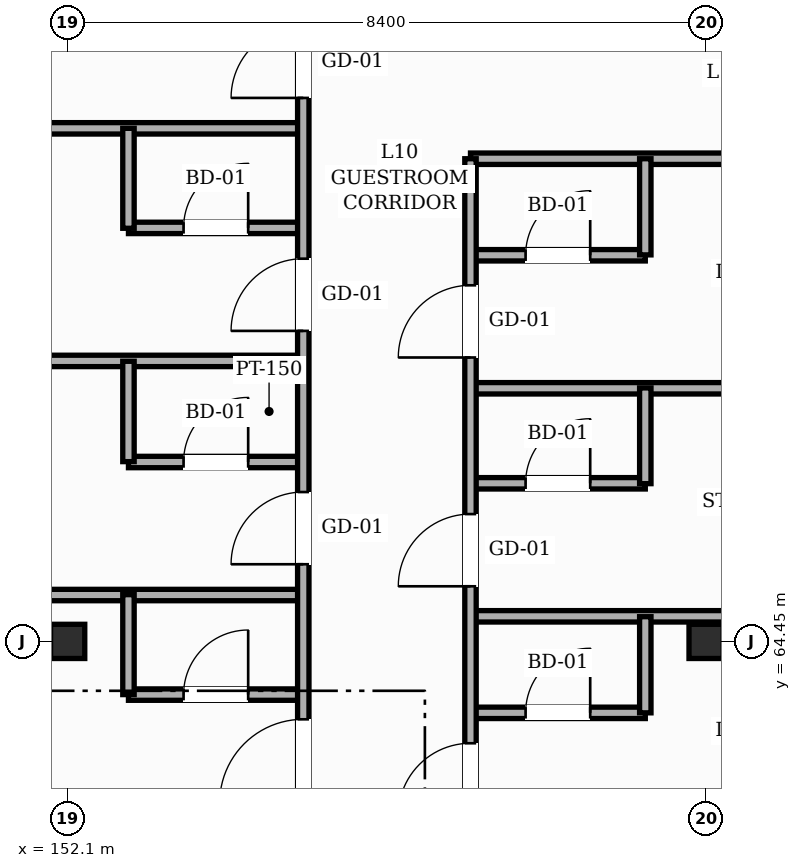
"""IFC4 building model, lengths in metres.
Left out: names, types, materials, properties, quantities, classifications, styles, units other than length and angle.
Written with IfcOpenShell. Run it as: python <this file> out.ifc"""

import sys

from ifc_helpers import new_model, si_unit, direction, frame, frame_2d, origin, origin_2d, place, context, subcontext, project, spatial, rectangle, hollow_rectangle, extrude, element, fill, save


model = new_model("IFC4")
c1 = context("Model", 3, precision=1e-05, world=origin(), true_north=direction((0.0, 1.0)))
c2 = subcontext(c1, "Body", "Model", "MODEL_VIEW")
j1 = project(units=[si_unit("LENGTHUNIT", "METRE"), si_unit("PLANEANGLEUNIT", "RADIAN")], contexts=[c1])
p1 = place(None, origin())
s1 = spatial("IfcSite", under=j1, at=p1, CompositionType="ELEMENT")
p2 = place(p1, origin())
s2 = spatial("IfcBuilding", under=s1, at=p2, CompositionType="ELEMENT")
p3 = place(p2, frame((0.0, 0.0, 42.6)))
s3 = spatial("IfcBuildingStorey", under=s2, at=p3, CompositionType="ELEMENT", Elevation=42.6)
for number, where, z_axis, x_axis in (
    (1, (152.1, 64.45, 0.0), (0.0, 0.0, 1.0), (1.0, 0.0, 0.0)),
    (2, (160.5, 64.45, 0.0), (0.0, 0.0, 1.0), (1.0, 0.0, 0.0)),
):
    element("IfcColumn", number, at=place(p3, frame(where, z_axis=z_axis, x_axis=x_axis)), inside=s3, PredefinedType="COLUMN", context=c2, shape_type="SweptSolid", body=[
        extrude(hollow_rectangle(XDim=0.45, YDim=0.45, WallThickness=0.019, InnerFilletRadius=0.019, OuterFilletRadius=0.038, at=origin_2d()), origin(), (0.0, 0.0, 1.0), 3.6),
    ])
p4 = place(p3, frame((157.4, 63.51, 0.0), z_axis=(0.0, 0.0, 1.0), x_axis=(1.0, 0.0, 0.0)))
e3 = element("IfcWall", 3, at=p4, inside=s3, PredefinedType="PARTITIONING", context=c2, shape_type="SweptSolid", body=[
    extrude(rectangle(XDim=2.3, YDim=0.15, at=frame_2d((1.15, 0.0))), origin(), (0.0, 0.0, 1.0), 3.365),
])
p5 = place(p4, frame((0.725, 0.0, 0.0)))
e4 = element("IfcOpeningElement", 4, at=p5, cuts=e3, PredefinedType="OPENING", context=c2, shape_type="SweptSolid", body=[
    extrude(rectangle(XDim=0.85, YDim=2.1, at=frame_2d((0.425, 1.05))), frame((0.0, 0.085, 0.0), z_axis=(0.0, -1.0, 0.0), x_axis=(1.0, 0.0, 0.0)), (0.0, 0.0, 1.0), 0.17),
])
p6 = place(p3, frame((152.9, 63.75, 0.0), z_axis=(0.0, 0.0, 1.0), x_axis=(1.0, 0.0, 0.0)))
e5 = element("IfcWall", 5, at=p6, inside=s3, PredefinedType="PARTITIONING", context=c2, shape_type="SweptSolid", body=[
    extrude(rectangle(XDim=2.3, YDim=0.15, at=frame_2d((1.15, 0.0))), origin(), (0.0, 0.0, 1.0), 3.365),
])
p7 = place(p6, frame((0.725, 0.0, 0.0)))
e6 = element("IfcOpeningElement", 6, at=p7, cuts=e5, PredefinedType="OPENING", context=c2, shape_type="SweptSolid", body=[
    extrude(rectangle(XDim=0.85, YDim=2.1, at=frame_2d((0.425, 1.05))), frame((0.0, 0.085, 0.0), z_axis=(0.0, -1.0, 0.0), x_axis=(1.0, 0.0, 0.0)), (0.0, 0.0, 1.0), 0.17),
])
p8 = place(p3, frame((157.4, 64.78, 0.0), z_axis=(0.0, 0.0, 1.0), x_axis=(1.0, 0.0, 0.0)))
e7 = element("IfcWall", 7, at=p8, inside=s3, PredefinedType="PARTITIONING", context=c2, shape_type="SweptSolid", body=[
    extrude(rectangle(XDim=9.8, YDim=0.15, at=frame_2d((4.9, 0.0))), origin(), (0.0, 0.0, 1.0), 3.365),
])
p9 = place(p3, frame((144.2, 65.06, 0.0), z_axis=(0.0, 0.0, 1.0), x_axis=(1.0, 0.0, 0.0)))
e8 = element("IfcWall", 8, at=p9, inside=s3, PredefinedType="PARTITIONING", context=c2, shape_type="SweptSolid", body=[
    extrude(rectangle(XDim=11.0, YDim=0.15, at=frame_2d((5.5, 0.0))), origin(), (0.0, 0.0, 1.0), 3.365),
])
p10 = place(p3, frame((157.4, 66.53, 0.0), z_axis=(0.0, 0.0, 1.0), x_axis=(1.0, 0.0, 0.0)))
e9 = element("IfcWall", 9, at=p10, inside=s3, PredefinedType="PARTITIONING", context=c2, shape_type="SweptSolid", body=[
    extrude(rectangle(XDim=2.3, YDim=0.15, at=frame_2d((1.15, 0.0))), origin(), (0.0, 0.0, 1.0), 3.365),
])
p11 = place(p10, frame((0.725, 0.0, 0.0)))
e10 = element("IfcOpeningElement", 10, at=p11, cuts=e9, PredefinedType="OPENING", context=c2, shape_type="SweptSolid", body=[
    extrude(rectangle(XDim=0.85, YDim=2.1, at=frame_2d((0.425, 1.05))), frame((0.0, 0.085, 0.0), z_axis=(0.0, -1.0, 0.0), x_axis=(1.0, 0.0, 0.0)), (0.0, 0.0, 1.0), 0.17),
])
p12 = place(p3, frame((152.9, 66.81, 0.0), z_axis=(0.0, 0.0, 1.0), x_axis=(1.0, 0.0, 0.0)))
e11 = element("IfcWall", 11, at=p12, inside=s3, PredefinedType="PARTITIONING", context=c2, shape_type="SweptSolid", body=[
    extrude(rectangle(XDim=2.3, YDim=0.15, at=frame_2d((1.15, 0.0))), origin(), (0.0, 0.0, 1.0), 3.365),
])
p13 = place(p12, frame((0.725, 0.0, 0.0)))
e12 = element("IfcOpeningElement", 12, at=p13, cuts=e11, PredefinedType="OPENING", context=c2, shape_type="SweptSolid", body=[
    extrude(rectangle(XDim=0.85, YDim=2.1, at=frame_2d((0.425, 1.05))), frame((0.0, 0.085, 0.0), z_axis=(0.0, -1.0, 0.0), x_axis=(1.0, 0.0, 0.0)), (0.0, 0.0, 1.0), 0.17),
])
p14 = place(p3, frame((157.4, 67.78, 0.0), z_axis=(0.0, 0.0, 1.0), x_axis=(1.0, 0.0, 0.0)))
e13 = element("IfcWall", 13, at=p14, inside=s3, PredefinedType="PARTITIONING", context=c2, shape_type="SweptSolid", body=[
    extrude(rectangle(XDim=9.8, YDim=0.15, at=frame_2d((4.9, 0.0))), origin(), (0.0, 0.0, 1.0), 3.365),
])
p15 = place(p3, frame((144.2, 68.14, 0.0), z_axis=(0.0, 0.0, 1.0), x_axis=(1.0, 0.0, 0.0)))
e14 = element("IfcWall", 14, at=p15, inside=s3, PredefinedType="PARTITIONING", context=c2, shape_type="SweptSolid", body=[
    extrude(rectangle(XDim=11.0, YDim=0.15, at=frame_2d((5.5, 0.0))), origin(), (0.0, 0.0, 1.0), 3.365),
])
p16 = place(p3, frame((157.4, 69.53, 0.0), z_axis=(0.0, 0.0, 1.0), x_axis=(1.0, 0.0, 0.0)))
e15 = element("IfcWall", 15, at=p16, inside=s3, PredefinedType="PARTITIONING", context=c2, shape_type="SweptSolid", body=[
    extrude(rectangle(XDim=2.3, YDim=0.15, at=frame_2d((1.15, 0.0))), origin(), (0.0, 0.0, 1.0), 3.365),
])
p17 = place(p16, frame((0.725, 0.0, 0.0)))
e16 = element("IfcOpeningElement", 16, at=p17, cuts=e15, PredefinedType="OPENING", context=c2, shape_type="SweptSolid", body=[
    extrude(rectangle(XDim=0.85, YDim=2.1, at=frame_2d((0.425, 1.05))), frame((0.0, 0.085, 0.0), z_axis=(0.0, -1.0, 0.0), x_axis=(1.0, 0.0, 0.0)), (0.0, 0.0, 1.0), 0.17),
])
p18 = place(p3, frame((152.9, 69.89, 0.0), z_axis=(0.0, 0.0, 1.0), x_axis=(1.0, 0.0, 0.0)))
e17 = element("IfcWall", 17, at=p18, inside=s3, PredefinedType="PARTITIONING", context=c2, shape_type="SweptSolid", body=[
    extrude(rectangle(XDim=2.3, YDim=0.15, at=frame_2d((1.15, 0.0))), origin(), (0.0, 0.0, 1.0), 3.365),
])
p19 = place(p18, frame((0.725, 0.0, 0.0)))
e18 = element("IfcOpeningElement", 18, at=p19, cuts=e17, PredefinedType="OPENING", context=c2, shape_type="SweptSolid", body=[
    extrude(rectangle(XDim=0.85, YDim=2.1, at=frame_2d((0.425, 1.05))), frame((0.0, 0.085, 0.0), z_axis=(0.0, -1.0, 0.0), x_axis=(1.0, 0.0, 0.0)), (0.0, 0.0, 1.0), 0.17),
])
p20 = place(p3, frame((157.4, 70.8, 0.0), z_axis=(0.0, 0.0, 1.0), x_axis=(1.0, 0.0, 0.0)))
e19 = element("IfcWall", 19, at=p20, inside=s3, PredefinedType="PARTITIONING", context=c2, shape_type="SweptSolid", body=[
    extrude(rectangle(XDim=9.8, YDim=0.15, at=frame_2d((4.9, 0.0))), origin(), (0.0, 0.0, 1.0), 3.365),
])
p21 = place(p3, frame((144.2, 71.2, 0.0), z_axis=(0.0, 0.0, 1.0), x_axis=(1.0, 0.0, 0.0)))
e20 = element("IfcWall", 20, at=p21, inside=s3, PredefinedType="PARTITIONING", context=c2, shape_type="SweptSolid", body=[
    extrude(rectangle(XDim=11.0, YDim=0.15, at=frame_2d((5.5, 0.0))), origin(), (0.0, 0.0, 1.0), 3.365),
])
p22 = place(p3, frame((152.9, 63.75, 0.0), z_axis=(0.0, 0.0, 1.0), x_axis=(0.0, 1.0, 0.0)))
e21 = element("IfcWall", 21, at=p22, inside=s3, PredefinedType="PARTITIONING", context=c2, shape_type="SweptSolid", body=[
    extrude(rectangle(XDim=1.315, YDim=0.15, at=frame_2d((0.657, 0.0))), origin(), (0.0, 0.0, 1.0), 3.365),
])
p23 = place(p3, frame((152.9, 66.815, 0.0), z_axis=(0.0, 0.0, 1.0), x_axis=(0.0, 1.0, 0.0)))
e22 = element("IfcWall", 22, at=p23, inside=s3, PredefinedType="PARTITIONING", context=c2, shape_type="SweptSolid", body=[
    extrude(rectangle(XDim=1.32, YDim=0.15, at=frame_2d((0.66, 0.0))), origin(), (0.0, 0.0, 1.0), 3.365),
])
p24 = place(p3, frame((152.9, 69.885, 0.0), z_axis=(0.0, 0.0, 1.0), x_axis=(0.0, 1.0, 0.0)))
e23 = element("IfcWall", 23, at=p24, inside=s3, PredefinedType="PARTITIONING", context=c2, shape_type="SweptSolid", body=[
    extrude(rectangle(XDim=1.315, YDim=0.15, at=frame_2d((0.657, 0.0))), origin(), (0.0, 0.0, 1.0), 3.365),
])
p25 = place(p3, frame((155.2, 62.0, 0.0), z_axis=(0.0, 0.0, 1.0), x_axis=(0.0, 1.0, 0.0)))
e24 = element("IfcWall", 24, at=p25, inside=s3, PredefinedType="PARTITIONING", context=c2, shape_type="SweptSolid", body=[
    extrude(rectangle(XDim=18.4, YDim=0.15, at=frame_2d((9.2, 0.0))), origin(), (0.0, 0.0, 1.0), 3.365),
])
p26 = place(p25, frame((0.325, 0.0, 0.0)))
e25 = element("IfcOpeningElement", 25, at=p26, cuts=e24, PredefinedType="OPENING", context=c2, shape_type="SweptSolid", body=[
    extrude(rectangle(XDim=1.1, YDim=2.2, at=frame_2d((0.55, 1.1))), frame((0.0, 0.085, 0.0), z_axis=(0.0, -1.0, 0.0), x_axis=(1.0, 0.0, 0.0)), (0.0, 0.0, 1.0), 0.17),
])
p27 = place(p25, frame((3.465, 0.0, 0.0)))
e26 = element("IfcOpeningElement", 26, at=p27, cuts=e24, PredefinedType="OPENING", context=c2, shape_type="SweptSolid", body=[
    extrude(rectangle(XDim=0.95, YDim=2.15, at=frame_2d((0.475, 1.075))), frame((0.0, 0.085, 0.0), z_axis=(0.0, -1.0, 0.0), x_axis=(1.0, 0.0, 0.0)), (0.0, 0.0, 1.0), 0.17),
])
p28 = place(p25, frame((6.535, 0.0, 0.0)))
e27 = element("IfcOpeningElement", 27, at=p28, cuts=e24, PredefinedType="OPENING", context=c2, shape_type="SweptSolid", body=[
    extrude(rectangle(XDim=0.95, YDim=2.15, at=frame_2d((0.475, 1.075))), frame((0.0, 0.085, 0.0), z_axis=(0.0, -1.0, 0.0), x_axis=(1.0, 0.0, 0.0)), (0.0, 0.0, 1.0), 0.17),
])
p29 = place(p25, frame((9.6, 0.0, 0.0)))
e28 = element("IfcOpeningElement", 28, at=p29, cuts=e24, PredefinedType="OPENING", context=c2, shape_type="SweptSolid", body=[
    extrude(rectangle(XDim=0.95, YDim=2.15, at=frame_2d((0.475, 1.075))), frame((0.0, 0.085, 0.0), z_axis=(0.0, -1.0, 0.0), x_axis=(1.0, 0.0, 0.0)), (0.0, 0.0, 1.0), 0.17),
])
p30 = place(p25, frame((12.665, 0.0, 0.0)))
e29 = element("IfcOpeningElement", 29, at=p30, cuts=e24, PredefinedType="OPENING", context=c2, shape_type="SweptSolid", body=[
    extrude(rectangle(XDim=0.95, YDim=2.15, at=frame_2d((0.475, 1.075))), frame((0.0, 0.085, 0.0), z_axis=(0.0, -1.0, 0.0), x_axis=(1.0, 0.0, 0.0)), (0.0, 0.0, 1.0), 0.17),
])
p31 = place(p25, frame((15.735, 0.0, 0.0)))
e30 = element("IfcOpeningElement", 30, at=p31, cuts=e24, PredefinedType="OPENING", context=c2, shape_type="SweptSolid", body=[
    extrude(rectangle(XDim=0.95, YDim=2.15, at=frame_2d((0.475, 1.075))), frame((0.0, 0.085, 0.0), z_axis=(0.0, -1.0, 0.0), x_axis=(1.0, 0.0, 0.0)), (0.0, 0.0, 1.0), 0.17),
])
p32 = place(p3, frame((157.4, 22.6, 0.0), z_axis=(0.0, 0.0, 1.0), x_axis=(0.0, 1.0, 0.0)))
e31 = element("IfcWall", 31, at=p32, inside=s3, PredefinedType="PARTITIONING", context=c2, shape_type="SweptSolid", body=[
    extrude(rectangle(XDim=48.2, YDim=0.15, at=frame_2d((24.1, 0.0))), origin(), (0.0, 0.0, 1.0), 3.365),
])
p33 = place(p32, frame((0.325, 0.0, 0.0)))
e32 = element("IfcOpeningElement", 32, at=p33, cuts=e31, PredefinedType="OPENING", context=c2, shape_type="SweptSolid", body=[
    extrude(rectangle(XDim=1.1, YDim=2.2, at=frame_2d((0.55, 1.1))), frame((0.0, 0.085, 0.0), z_axis=(0.0, -1.0, 0.0), x_axis=(1.0, 0.0, 0.0)), (0.0, 0.0, 1.0), 0.17),
])
p34 = place(p32, frame((3.41, 0.0, 0.0)))
e33 = element("IfcOpeningElement", 33, at=p34, cuts=e31, PredefinedType="OPENING", context=c2, shape_type="SweptSolid", body=[
    extrude(rectangle(XDim=0.95, YDim=2.15, at=frame_2d((0.475, 1.075))), frame((0.0, 0.085, 0.0), z_axis=(0.0, -1.0, 0.0), x_axis=(1.0, 0.0, 0.0)), (0.0, 0.0, 1.0), 0.17),
])
p35 = place(p32, frame((6.425, 0.0, 0.0)))
e34 = element("IfcOpeningElement", 34, at=p35, cuts=e31, PredefinedType="OPENING", context=c2, shape_type="SweptSolid", body=[
    extrude(rectangle(XDim=0.95, YDim=2.15, at=frame_2d((0.475, 1.075))), frame((0.0, 0.085, 0.0), z_axis=(0.0, -1.0, 0.0), x_axis=(1.0, 0.0, 0.0)), (0.0, 0.0, 1.0), 0.17),
])
p36 = place(p32, frame((9.44, 0.0, 0.0)))
e35 = element("IfcOpeningElement", 35, at=p36, cuts=e31, PredefinedType="OPENING", context=c2, shape_type="SweptSolid", body=[
    extrude(rectangle(XDim=0.95, YDim=2.15, at=frame_2d((0.475, 1.075))), frame((0.0, 0.085, 0.0), z_axis=(0.0, -1.0, 0.0), x_axis=(1.0, 0.0, 0.0)), (0.0, 0.0, 1.0), 0.17),
])
p37 = place(p32, frame((12.45, 0.0, 0.0)))
e36 = element("IfcOpeningElement", 36, at=p37, cuts=e31, PredefinedType="OPENING", context=c2, shape_type="SweptSolid", body=[
    extrude(rectangle(XDim=0.95, YDim=2.15, at=frame_2d((0.475, 1.075))), frame((0.0, 0.085, 0.0), z_axis=(0.0, -1.0, 0.0), x_axis=(1.0, 0.0, 0.0)), (0.0, 0.0, 1.0), 0.17),
])
p38 = place(p32, frame((15.46, 0.0, 0.0)))
e37 = element("IfcOpeningElement", 37, at=p38, cuts=e31, PredefinedType="OPENING", context=c2, shape_type="SweptSolid", body=[
    extrude(rectangle(XDim=0.95, YDim=2.15, at=frame_2d((0.475, 1.075))), frame((0.0, 0.085, 0.0), z_axis=(0.0, -1.0, 0.0), x_axis=(1.0, 0.0, 0.0)), (0.0, 0.0, 1.0), 0.17),
])
p39 = place(p32, frame((18.475, 0.0, 0.0)))
e38 = element("IfcOpeningElement", 38, at=p39, cuts=e31, PredefinedType="OPENING", context=c2, shape_type="SweptSolid", body=[
    extrude(rectangle(XDim=0.95, YDim=2.15, at=frame_2d((0.475, 1.075))), frame((0.0, 0.085, 0.0), z_axis=(0.0, -1.0, 0.0), x_axis=(1.0, 0.0, 0.0)), (0.0, 0.0, 1.0), 0.17),
])
p40 = place(p32, frame((21.49, 0.0, 0.0)))
e39 = element("IfcOpeningElement", 39, at=p40, cuts=e31, PredefinedType="OPENING", context=c2, shape_type="SweptSolid", body=[
    extrude(rectangle(XDim=0.95, YDim=2.15, at=frame_2d((0.475, 1.075))), frame((0.0, 0.085, 0.0), z_axis=(0.0, -1.0, 0.0), x_axis=(1.0, 0.0, 0.0)), (0.0, 0.0, 1.0), 0.17),
])
p41 = place(p32, frame((24.5, 0.0, 0.0)))
e40 = element("IfcOpeningElement", 40, at=p41, cuts=e31, PredefinedType="OPENING", context=c2, shape_type="SweptSolid", body=[
    extrude(rectangle(XDim=0.95, YDim=2.15, at=frame_2d((0.475, 1.075))), frame((0.0, 0.085, 0.0), z_axis=(0.0, -1.0, 0.0), x_axis=(1.0, 0.0, 0.0)), (0.0, 0.0, 1.0), 0.17),
])
p42 = place(p32, frame((27.51, 0.0, 0.0)))
e41 = element("IfcOpeningElement", 41, at=p42, cuts=e31, PredefinedType="OPENING", context=c2, shape_type="SweptSolid", body=[
    extrude(rectangle(XDim=0.95, YDim=2.15, at=frame_2d((0.475, 1.075))), frame((0.0, 0.085, 0.0), z_axis=(0.0, -1.0, 0.0), x_axis=(1.0, 0.0, 0.0)), (0.0, 0.0, 1.0), 0.17),
])
p43 = place(p32, frame((30.525, 0.0, 0.0)))
e42 = element("IfcOpeningElement", 42, at=p43, cuts=e31, PredefinedType="OPENING", context=c2, shape_type="SweptSolid", body=[
    extrude(rectangle(XDim=0.95, YDim=2.15, at=frame_2d((0.475, 1.075))), frame((0.0, 0.085, 0.0), z_axis=(0.0, -1.0, 0.0), x_axis=(1.0, 0.0, 0.0)), (0.0, 0.0, 1.0), 0.17),
])
p44 = place(p32, frame((33.54, 0.0, 0.0)))
e43 = element("IfcOpeningElement", 43, at=p44, cuts=e31, PredefinedType="OPENING", context=c2, shape_type="SweptSolid", body=[
    extrude(rectangle(XDim=0.95, YDim=2.15, at=frame_2d((0.475, 1.075))), frame((0.0, 0.085, 0.0), z_axis=(0.0, -1.0, 0.0), x_axis=(1.0, 0.0, 0.0)), (0.0, 0.0, 1.0), 0.17),
])
p45 = place(p32, frame((36.55, 0.0, 0.0)))
e44 = element("IfcOpeningElement", 44, at=p45, cuts=e31, PredefinedType="OPENING", context=c2, shape_type="SweptSolid", body=[
    extrude(rectangle(XDim=0.95, YDim=2.15, at=frame_2d((0.475, 1.075))), frame((0.0, 0.085, 0.0), z_axis=(0.0, -1.0, 0.0), x_axis=(1.0, 0.0, 0.0)), (0.0, 0.0, 1.0), 0.17),
])
p46 = place(p32, frame((39.56, 0.0, 0.0)))
e45 = element("IfcOpeningElement", 45, at=p46, cuts=e31, PredefinedType="OPENING", context=c2, shape_type="SweptSolid", body=[
    extrude(rectangle(XDim=0.95, YDim=2.15, at=frame_2d((0.475, 1.075))), frame((0.0, 0.085, 0.0), z_axis=(0.0, -1.0, 0.0), x_axis=(1.0, 0.0, 0.0)), (0.0, 0.0, 1.0), 0.17),
])
p47 = place(p32, frame((42.575, 0.0, 0.0)))
e46 = element("IfcOpeningElement", 46, at=p47, cuts=e31, PredefinedType="OPENING", context=c2, shape_type="SweptSolid", body=[
    extrude(rectangle(XDim=0.95, YDim=2.15, at=frame_2d((0.475, 1.075))), frame((0.0, 0.085, 0.0), z_axis=(0.0, -1.0, 0.0), x_axis=(1.0, 0.0, 0.0)), (0.0, 0.0, 1.0), 0.17),
])
p48 = place(p32, frame((45.585, 0.0, 0.0)))
e47 = element("IfcOpeningElement", 47, at=p48, cuts=e31, PredefinedType="OPENING", context=c2, shape_type="SweptSolid", body=[
    extrude(rectangle(XDim=0.95, YDim=2.15, at=frame_2d((0.475, 1.075))), frame((0.0, 0.085, 0.0), z_axis=(0.0, -1.0, 0.0), x_axis=(1.0, 0.0, 0.0)), (0.0, 0.0, 1.0), 0.17),
])
p49 = place(p3, frame((159.7, 63.51, 0.0), z_axis=(0.0, 0.0, 1.0), x_axis=(0.0, 1.0, 0.0)))
e48 = element("IfcWall", 48, at=p49, inside=s3, PredefinedType="PARTITIONING", context=c2, shape_type="SweptSolid", body=[
    extrude(rectangle(XDim=1.265, YDim=0.15, at=frame_2d((0.632, 0.0))), origin(), (0.0, 0.0, 1.0), 3.365),
])
p50 = place(p3, frame((159.7, 66.525, 0.0), z_axis=(0.0, 0.0, 1.0), x_axis=(0.0, 1.0, 0.0)))
e49 = element("IfcWall", 49, at=p50, inside=s3, PredefinedType="PARTITIONING", context=c2, shape_type="SweptSolid", body=[
    extrude(rectangle(XDim=1.26, YDim=0.15, at=frame_2d((0.63, 0.0))), origin(), (0.0, 0.0, 1.0), 3.365),
])
p51 = place(p3, frame((159.7, 69.535, 0.0), z_axis=(0.0, 0.0, 1.0), x_axis=(0.0, 1.0, 0.0)))
e50 = element("IfcWall", 50, at=p51, inside=s3, PredefinedType="PARTITIONING", context=c2, shape_type="SweptSolid", body=[
    extrude(rectangle(XDim=1.265, YDim=0.15, at=frame_2d((0.633, 0.0))), origin(), (0.0, 0.0, 1.0), 3.365),
])
p52 = place(p26, origin())
e51 = element("IfcDoor", 51, at=p52, inside=s3, OperationType="SINGLE_SWING_LEFT", PredefinedType="DOOR", context=c2, shape_type="SweptSolid", body=[
    extrude(rectangle(XDim=1.1, YDim=2.2, at=frame_2d((0.55, 1.1))), frame((0.0, 0.025, 0.0), z_axis=(0.0, -1.0, 0.0), x_axis=(1.0, 0.0, 0.0)), (0.0, 0.0, 1.0), 0.05),
])
fill(e25, e51)
p53 = place(p7, origin())
e52 = element("IfcDoor", 52, at=p53, inside=s3, OperationType="SINGLE_SWING_RIGHT", PredefinedType="DOOR", context=c2, shape_type="SweptSolid", body=[
    extrude(rectangle(XDim=0.85, YDim=2.1, at=frame_2d((0.425, 1.05))), frame((0.0, 0.025, 0.0), z_axis=(0.0, -1.0, 0.0), x_axis=(1.0, 0.0, 0.0)), (0.0, 0.0, 1.0), 0.05),
])
fill(e6, e52)
p54 = place(p27, origin())
e53 = element("IfcDoor", 53, at=p54, inside=s3, OperationType="SINGLE_SWING_LEFT", PredefinedType="DOOR", context=c2, shape_type="SweptSolid", body=[
    extrude(rectangle(XDim=0.95, YDim=2.15, at=frame_2d((0.475, 1.075))), frame((0.0, 0.025, 0.0), z_axis=(0.0, -1.0, 0.0), x_axis=(1.0, 0.0, 0.0)), (0.0, 0.0, 1.0), 0.05),
])
fill(e26, e53)
p55 = place(p13, origin())
e54 = element("IfcDoor", 54, at=p55, inside=s3, OperationType="SINGLE_SWING_RIGHT", PredefinedType="DOOR", context=c2, shape_type="SweptSolid", body=[
    extrude(rectangle(XDim=0.85, YDim=2.1, at=frame_2d((0.425, 1.05))), frame((0.0, 0.025, 0.0), z_axis=(0.0, -1.0, 0.0), x_axis=(1.0, 0.0, 0.0)), (0.0, 0.0, 1.0), 0.05),
])
fill(e12, e54)
p56 = place(p28, origin())
e55 = element("IfcDoor", 55, at=p56, inside=s3, OperationType="SINGLE_SWING_LEFT", PredefinedType="DOOR", context=c2, shape_type="SweptSolid", body=[
    extrude(rectangle(XDim=0.95, YDim=2.15, at=frame_2d((0.475, 1.075))), frame((0.0, 0.025, 0.0), z_axis=(0.0, -1.0, 0.0), x_axis=(1.0, 0.0, 0.0)), (0.0, 0.0, 1.0), 0.05),
])
fill(e27, e55)
p57 = place(p19, origin())
e56 = element("IfcDoor", 56, at=p57, inside=s3, OperationType="SINGLE_SWING_RIGHT", PredefinedType="DOOR", context=c2, shape_type="SweptSolid", body=[
    extrude(rectangle(XDim=0.85, YDim=2.1, at=frame_2d((0.425, 1.05))), frame((0.0, 0.025, 0.0), z_axis=(0.0, -1.0, 0.0), x_axis=(1.0, 0.0, 0.0)), (0.0, 0.0, 1.0), 0.05),
])
fill(e18, e56)
p58 = place(p29, origin())
e57 = element("IfcDoor", 57, at=p58, inside=s3, OperationType="SINGLE_SWING_LEFT", PredefinedType="DOOR", context=c2, shape_type="SweptSolid", body=[
    extrude(rectangle(XDim=0.95, YDim=2.15, at=frame_2d((0.475, 1.075))), frame((0.0, 0.025, 0.0), z_axis=(0.0, -1.0, 0.0), x_axis=(1.0, 0.0, 0.0)), (0.0, 0.0, 1.0), 0.05),
])
fill(e28, e57)
p59 = place(p46, origin())
e58 = element("IfcDoor", 58, at=p59, inside=s3, OperationType="SINGLE_SWING_LEFT", PredefinedType="DOOR", context=c2, shape_type="SweptSolid", body=[
    extrude(rectangle(XDim=0.95, YDim=2.15, at=frame_2d((0.475, 1.075))), frame((0.0, 0.025, 0.0), z_axis=(0.0, -1.0, 0.0), x_axis=(1.0, 0.0, 0.0)), (0.0, 0.0, 1.0), 0.05),
])
fill(e45, e58)
p60 = place(p5, origin())
e59 = element("IfcDoor", 59, at=p60, inside=s3, OperationType="SINGLE_SWING_RIGHT", PredefinedType="DOOR", context=c2, shape_type="SweptSolid", body=[
    extrude(rectangle(XDim=0.85, YDim=2.1, at=frame_2d((0.425, 1.05))), frame((0.0, 0.025, 0.0), z_axis=(0.0, -1.0, 0.0), x_axis=(1.0, 0.0, 0.0)), (0.0, 0.0, 1.0), 0.05),
])
fill(e4, e59)
p61 = place(p47, origin())
e60 = element("IfcDoor", 60, at=p61, inside=s3, OperationType="SINGLE_SWING_LEFT", PredefinedType="DOOR", context=c2, shape_type="SweptSolid", body=[
    extrude(rectangle(XDim=0.95, YDim=2.15, at=frame_2d((0.475, 1.075))), frame((0.0, 0.025, 0.0), z_axis=(0.0, -1.0, 0.0), x_axis=(1.0, 0.0, 0.0)), (0.0, 0.0, 1.0), 0.05),
])
fill(e46, e60)
p62 = place(p11, origin())
e61 = element("IfcDoor", 61, at=p62, inside=s3, OperationType="SINGLE_SWING_RIGHT", PredefinedType="DOOR", context=c2, shape_type="SweptSolid", body=[
    extrude(rectangle(XDim=0.85, YDim=2.1, at=frame_2d((0.425, 1.05))), frame((0.0, 0.025, 0.0), z_axis=(0.0, -1.0, 0.0), x_axis=(1.0, 0.0, 0.0)), (0.0, 0.0, 1.0), 0.05),
])
fill(e10, e61)
p63 = place(p48, origin())
e62 = element("IfcDoor", 62, at=p63, inside=s3, OperationType="SINGLE_SWING_LEFT", PredefinedType="DOOR", context=c2, shape_type="SweptSolid", body=[
    extrude(rectangle(XDim=0.95, YDim=2.15, at=frame_2d((0.475, 1.075))), frame((0.0, 0.025, 0.0), z_axis=(0.0, -1.0, 0.0), x_axis=(1.0, 0.0, 0.0)), (0.0, 0.0, 1.0), 0.05),
])
fill(e47, e62)
p64 = place(p17, origin())
e63 = element("IfcDoor", 63, at=p64, inside=s3, OperationType="SINGLE_SWING_RIGHT", PredefinedType="DOOR", context=c2, shape_type="SweptSolid", body=[
    extrude(rectangle(XDim=0.85, YDim=2.1, at=frame_2d((0.425, 1.05))), frame((0.0, 0.025, 0.0), z_axis=(0.0, -1.0, 0.0), x_axis=(1.0, 0.0, 0.0)), (0.0, 0.0, 1.0), 0.05),
])
fill(e16, e63)
save(model, sys.argv[1])
